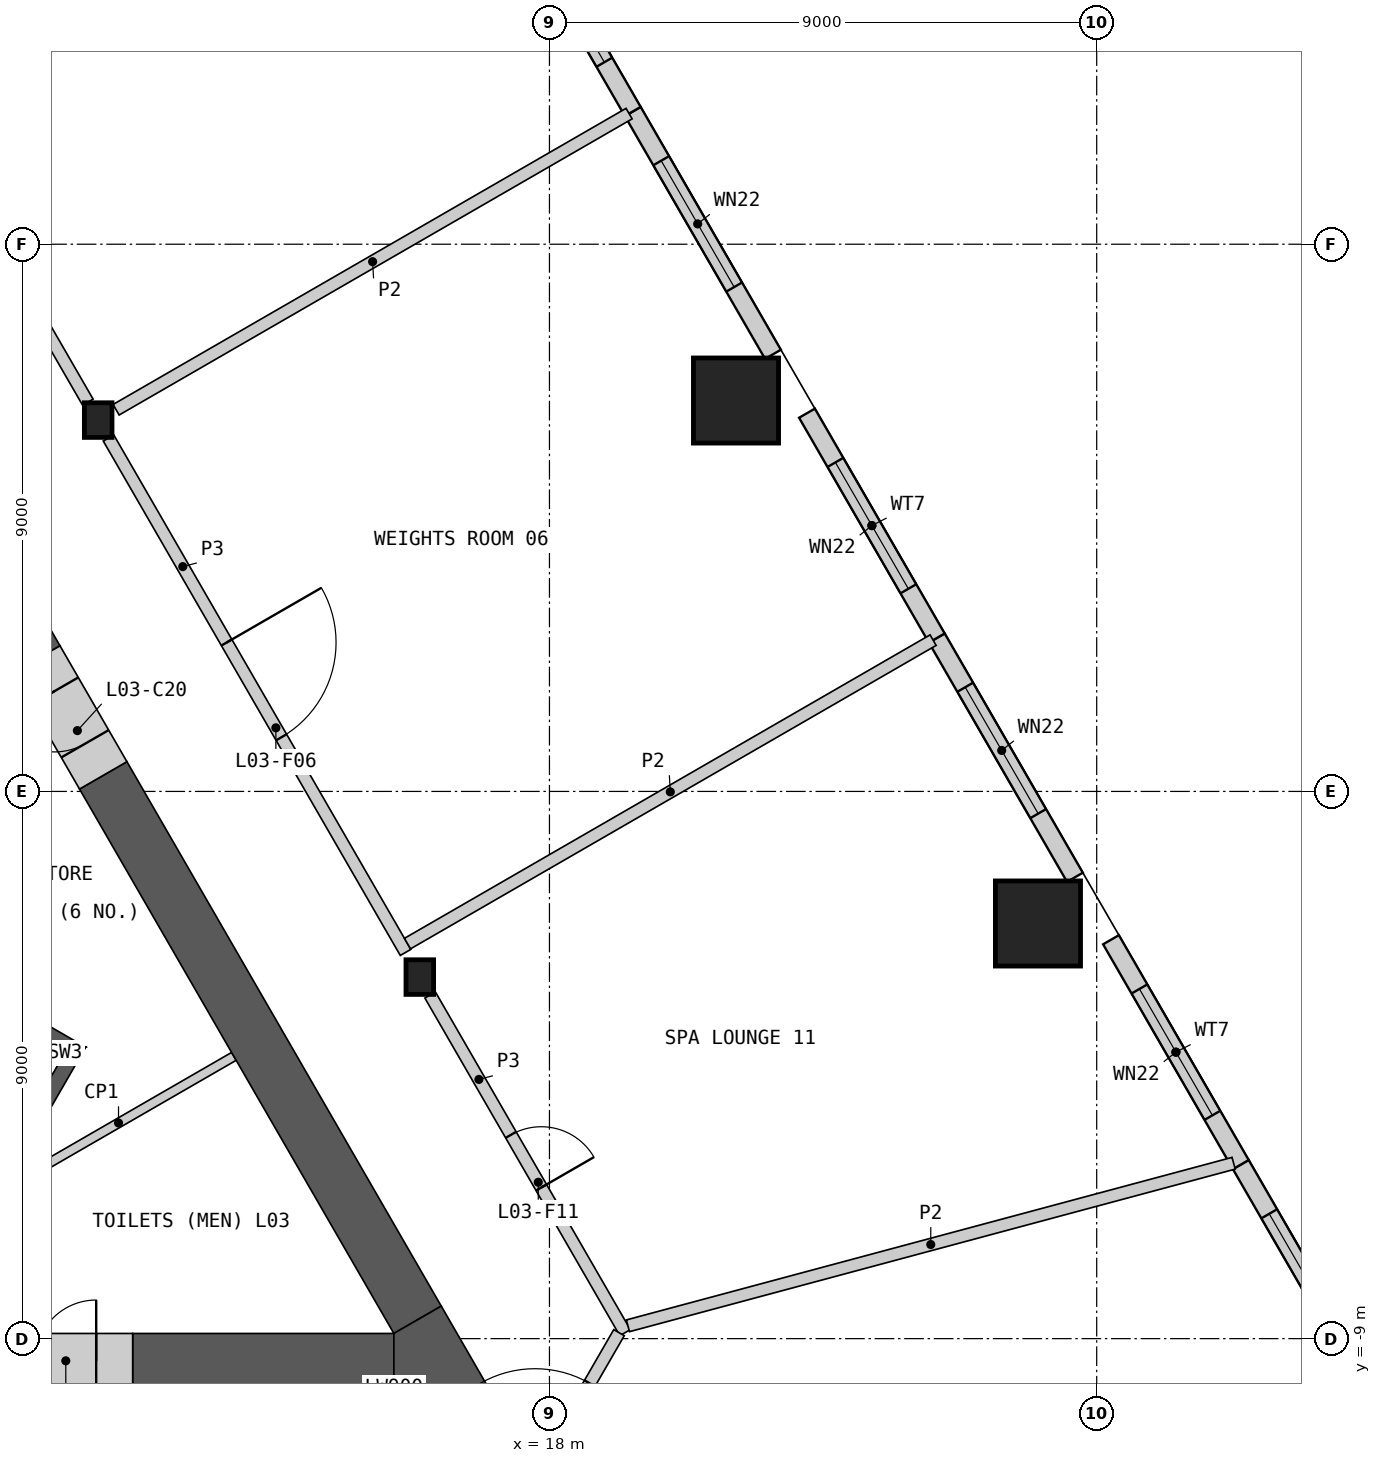
"""IFC4 building model, lengths in metres.
Left out: names, types, materials, properties, quantities, classifications, styles, units other than length and angle.
Written with IfcOpenShell. Run it as: python <this file> out.ifc"""

import sys

from ifc_helpers import new_model, si_unit, direction, frame, frame_2d, origin, origin_2d, place, context, subcontext, project, spatial, polyline, rectangle, hollow_rectangle, i_section, outline, extrude, element, fill, save


model = new_model("IFC4")
c1 = context("Model", 3, precision=1e-05, world=origin(), true_north=direction((0.0, 1.0)))
c2 = subcontext(c1, "Body", "Model", "MODEL_VIEW")
j1 = project(units=[si_unit("LENGTHUNIT", "METRE"), si_unit("PLANEANGLEUNIT", "RADIAN")], contexts=[c1])
p1 = place(None, origin())
s1 = spatial("IfcSite", under=j1, at=p1, CompositionType="ELEMENT")
p2 = place(p1, origin())
s2 = spatial("IfcBuilding", under=s1, at=p2, CompositionType="ELEMENT")
p3 = place(p2, frame((0.0, 0.0, 21.0)))
s3 = spatial("IfcBuildingStorey", under=s2, at=p3, CompositionType="ELEMENT", Elevation=21.0)
for number, where, z_axis, x_axis in (
    (1, (26.034, -2.172, 0.0), (0.0, 0.0, 1.0), (1.0, 0.0, 0.0)),
    (2, (21.068, 6.429, 0.0), (0.0, 0.0, 1.0), (1.0, 0.0, 0.0)),
):
    element("IfcColumn", number, at=place(p3, frame(where, z_axis=z_axis, x_axis=x_axis)), inside=s3, PredefinedType="COLUMN", context=c2, shape_type="SweptSolid", body=[
        extrude(hollow_rectangle(XDim=1.4, YDim=1.4, WallThickness=0.1, at=origin_2d()), origin(), (0.0, 0.0, 1.0), 4.5),
    ])
for number, where, z_axis, x_axis in (
    (3, (15.868, -3.054, 0.0), (0.0, 0.0, 1.0), (1.0, 0.0, 0.0)),
    (4, (10.578, 6.107, 0.0), (0.0, 0.0, 1.0), (1.0, 0.0, 0.0)),
):
    element("IfcColumn", number, at=place(p3, frame(where, z_axis=z_axis, x_axis=x_axis)), inside=s3, PredefinedType="COLUMN", context=c2, shape_type="SweptSolid", body=[
        extrude(i_section(OverallWidth=0.454, OverallDepth=0.57, WebThickness=0.078, FlangeThickness=0.125, at=origin_2d()), origin(), (0.0, 0.0, 1.0), 4.5),
    ])
p4 = place(p3, frame((31.608, -10.014, 0.0), z_axis=(0.0, 0.0, 1.0), x_axis=(-0.49999314502, 0.866029361473, 0.0)))
e5 = element("IfcWall", 5, at=p4, inside=s3, PredefinedType="SOLIDWALL", context=c2, shape_type="SweptSolid", body=[
    extrude(rectangle(XDim=4.476, YDim=0.3, at=frame_2d((2.238, 0.0))), origin(), (0.0, 0.0, 1.0), 4.05),
])
p5 = place(p4, frame((1.141, 0.0, 0.9)))
e6 = element("IfcOpeningElement", 6, at=p5, cuts=e5, PredefinedType="OPENING", context=c2, shape_type="SweptSolid", body=[
    extrude(rectangle(XDim=2.4, YDim=2.55, at=frame_2d((1.2, 1.275))), frame((0.0, 0.16, 0.0), z_axis=(0.0, -1.0, 0.0), x_axis=(1.0, 0.0, 0.0)), (0.0, 0.0, 1.0), 0.32),
])
p6 = place(p3, frame((29.37, -6.137, 0.0), z_axis=(0.0, 0.0, 1.0), x_axis=(-0.499994660107, 0.866028486751, 0.0)))
e7 = element("IfcWall", 7, at=p6, inside=s3, PredefinedType="SOLIDWALL", context=c2, shape_type="SweptSolid", body=[
    extrude(rectangle(XDim=4.27, YDim=0.3, at=frame_2d((2.135, 0.0))), origin(), (0.0, 0.0, 1.0), 4.05),
])
p7 = place(p6, frame((0.935, 0.0, 0.9)))
e8 = element("IfcOpeningElement", 8, at=p7, cuts=e7, PredefinedType="OPENING", context=c2, shape_type="SweptSolid", body=[
    extrude(rectangle(XDim=2.4, YDim=2.55, at=frame_2d((1.2, 1.275))), frame((0.0, 0.16, 0.0), z_axis=(0.0, -1.0, 0.0), x_axis=(1.0, 0.0, 0.0)), (0.0, 0.0, 1.0), 0.32),
])
p8 = place(p3, frame((26.642, -1.412, 0.0), z_axis=(0.0, 0.0, 1.0), x_axis=(-0.499964285679, 0.866046022475, 0.0)))
e9 = element("IfcWall", 9, at=p8, inside=s3, PredefinedType="SOLIDWALL", context=c2, shape_type="SweptSolid", body=[
    extrude(rectangle(XDim=4.544, YDim=0.3, at=frame_2d((2.272, 0.0))), origin(), (0.0, 0.0, 1.0), 4.05),
])
p9 = place(p8, frame((1.209, 0.0, 0.9)))
e10 = element("IfcOpeningElement", 10, at=p9, cuts=e9, PredefinedType="OPENING", context=c2, shape_type="SweptSolid", body=[
    extrude(rectangle(XDim=2.4, YDim=2.55, at=frame_2d((1.2, 1.275))), frame((0.0, 0.16, 0.0), z_axis=(0.0, -1.0, 0.0), x_axis=(1.0, 0.0, 0.0)), (0.0, 0.0, 1.0), 0.32),
])
p10 = place(p3, frame((24.37, 2.523, 0.0), z_axis=(0.0, 0.0, 1.0), x_axis=(-0.500019418418, 0.866014192265, 0.0)))
e11 = element("IfcWall", 11, at=p10, inside=s3, PredefinedType="SOLIDWALL", context=c2, shape_type="SweptSolid", body=[
    extrude(rectangle(XDim=4.27, YDim=0.3, at=frame_2d((2.135, 0.0))), origin(), (0.0, 0.0, 1.0), 4.05),
])
p11 = place(p10, frame((0.935, 0.0, 0.9)))
e12 = element("IfcOpeningElement", 12, at=p11, cuts=e11, PredefinedType="OPENING", context=c2, shape_type="SweptSolid", body=[
    extrude(rectangle(XDim=2.4, YDim=2.55, at=frame_2d((1.2, 1.275))), frame((0.0, 0.16, 0.0), z_axis=(0.0, -1.0, 0.0), x_axis=(1.0, 0.0, 0.0)), (0.0, 0.0, 1.0), 0.32),
])
p12 = place(p3, frame((21.676, 7.189, 0.0), z_axis=(0.0, 0.0, 1.0), x_axis=(-0.499982117899, 0.866035727774, 0.0)))
e13 = element("IfcWall", 13, at=p12, inside=s3, PredefinedType="SOLIDWALL", context=c2, shape_type="SweptSolid", body=[
    extrude(rectangle(XDim=4.612, YDim=0.3, at=frame_2d((2.306, 0.0))), origin(), (0.0, 0.0, 1.0), 4.05),
])
p13 = place(p12, frame((1.277, 0.0, 0.9)))
e14 = element("IfcOpeningElement", 14, at=p13, cuts=e13, PredefinedType="OPENING", context=c2, shape_type="SweptSolid", body=[
    extrude(rectangle(XDim=2.4, YDim=2.55, at=frame_2d((1.2, 1.275))), frame((0.0, 0.16, 0.0), z_axis=(0.0, -1.0, 0.0), x_axis=(1.0, 0.0, 0.0)), (0.0, 0.0, 1.0), 0.32),
])
p14 = place(p3, frame((19.37, 11.183, 0.0), z_axis=(0.0, 0.0, 1.0), x_axis=(-0.499994660107, 0.866028486751, 0.0)))
e15 = element("IfcWall", 15, at=p14, inside=s3, PredefinedType="SOLIDWALL", context=c2, shape_type="SweptSolid", body=[
    extrude(rectangle(XDim=4.27, YDim=0.3, at=frame_2d((2.135, 0.0))), origin(), (0.0, 0.0, 1.0), 4.05),
])
p15 = place(p14, frame((0.935, 0.0, 0.9)))
e16 = element("IfcOpeningElement", 16, at=p15, cuts=e15, PredefinedType="OPENING", context=c2, shape_type="SweptSolid", body=[
    extrude(rectangle(XDim=2.4, YDim=2.55, at=frame_2d((1.2, 1.275))), frame((0.0, 0.16, 0.0), z_axis=(0.0, -1.0, 0.0), x_axis=(1.0, 0.0, 0.0)), (0.0, 0.0, 1.0), 0.32),
])
p16 = place(p3, origin())
e17 = element("IfcWall", 17, at=p16, inside=s3, PredefinedType="SHEAR", context=c2, shape_type="SweptSolid", body=[
    extrude(outline(polyline([(8.83, -6.881), (10.374, -4.206), (10.032, -4.298), (8.738, -6.539), (8.83, -6.881)])), origin(), (0.0, 0.0, 1.0), 4.05),
])
p17 = place(p3, origin())
e18 = element("IfcWall", 18, at=p17, inside=s3, PredefinedType="SHEAR", context=c2, shape_type="SweptSolid", body=[
    extrude(outline(polyline([(10.032, -4.298), (10.374, -4.206), (5.307, -1.281), (5.182, -1.498), (10.032, -4.298)])), origin(), (0.0, 0.0, 1.0), 4.05),
])
p18 = place(p3, frame((12.81, -4.358, 0.0), z_axis=(0.0, 0.0, 1.0), x_axis=(-0.866043624834, -0.499968438888, 0.0)))
e19 = element("IfcWall", 19, at=p18, inside=s3, PredefinedType="PARTITIONING", context=c2, shape_type="SweptSolid", body=[
    extrude(rectangle(XDim=4.382, YDim=0.15, at=frame_2d((2.191, 0.0))), origin(), (0.0, 0.0, 1.0), 4.05),
])
p19 = place(p3, frame((11.146, -9.365, 0.0), z_axis=(0.0, 0.0, 1.0), x_axis=(1.0, 0.0, 0.0)))
e20 = element("IfcWall", 20, at=p19, inside=s3, PredefinedType="SHEAR", context=c2, shape_type="SweptSolid", body=[
    extrude(rectangle(XDim=4.296, YDim=0.9, at=frame_2d((2.148, 0.0))), origin(), (0.0, 0.0, 1.0), 4.05),
])
p20 = place(p3, frame((15.831, -8.69, 0.0), z_axis=(0.0, 0.0, 1.0), x_axis=(-0.500001798008, 0.866024365702, 0.0)))
e21 = element("IfcWall", 21, at=p20, inside=s3, PredefinedType="SHEAR", context=c2, shape_type="SweptSolid", body=[
    extrude(rectangle(XDim=10.339, YDim=0.9, at=frame_2d((5.17, 0.0))), origin(), (0.0, 0.0, 1.0), 4.05),
])
p21 = place(p3, frame((9.561, 2.169, 0.0), z_axis=(0.0, 0.0, 1.0), x_axis=(-0.499995114243, 0.866028224559, 0.0)))
e22 = element("IfcWall", 22, at=p21, inside=s3, PredefinedType="SHEAR", context=c2, shape_type="SweptSolid", body=[
    extrude(rectangle(XDim=7.906, YDim=0.9, at=frame_2d((3.953, 0.0))), origin(), (0.0, 0.0, 1.0), 4.05),
])
p22 = place(p3, origin())
e23 = element("IfcWall", 23, at=p22, inside=s3, PredefinedType="SHEAR", context=c2, shape_type="SweptSolid", body=[
    extrude(outline(polyline([(15.441, -9.815), (15.441, -8.915), (16.221, -8.465), (17.0, -9.815), (15.441, -9.815)])), origin(), (0.0, 0.0, 1.0), 4.05),
])
p23 = place(p3, frame((8.946, -9.365, 0.0), z_axis=(0.0, 0.0, 1.0), x_axis=(1.0, 0.0, 0.0)))
e24 = element("IfcWall", 24, at=p23, inside=s3, PredefinedType="SHEAR", context=c2, shape_type="SweptSolid", body=[
    extrude(rectangle(XDim=2.2, YDim=0.9, at=frame_2d((1.1, 0.0))), origin(), (0.0, 0.0, 1.0), 4.05),
])
p24 = place(p23, frame((0.6, 0.0, 0.0)))
e25 = element("IfcOpeningElement", 25, at=p24, cuts=e24, PredefinedType="OPENING", context=c2, shape_type="SweptSolid", body=[
    extrude(rectangle(XDim=1.0, YDim=2.1, at=frame_2d((0.5, 1.05))), frame((0.0, 0.46, 0.0), z_axis=(0.0, -1.0, 0.0), x_axis=(1.0, 0.0, 0.0)), (0.0, 0.0, 1.0), 0.92),
])
p25 = place(p3, frame((10.661, 0.264, 0.0), z_axis=(0.0, 0.0, 1.0), x_axis=(-0.500077893725, 0.86598042715, 0.0)))
e26 = element("IfcWall", 26, at=p25, inside=s3, PredefinedType="SHEAR", context=c2, shape_type="SweptSolid", body=[
    extrude(rectangle(XDim=2.2, YDim=0.9, at=frame_2d((1.1, 0.0))), origin(), (0.0, 0.0, 1.0), 4.05),
])
p26 = place(p25, frame((0.6, 0.0, 0.0)))
e27 = element("IfcOpeningElement", 27, at=p26, cuts=e26, PredefinedType="OPENING", context=c2, shape_type="SweptSolid", body=[
    extrude(rectangle(XDim=1.0, YDim=2.1, at=frame_2d((0.5, 1.05))), frame((0.0, 0.46, 0.0), z_axis=(0.0, -1.0, 0.0), x_axis=(1.0, 0.0, 0.0)), (0.0, 0.0, 1.0), 0.92),
])
p27 = place(p3, frame((5.459, 14.974, 0.0), z_axis=(0.0, 0.0, 1.0), x_axis=(0.499985793049, -0.866033606016, 0.0)))
e28 = element("IfcWall", 28, at=p27, inside=s3, PredefinedType="PARTITIONING", context=c2, shape_type="SweptSolid", body=[
    extrude(rectangle(XDim=9.898, YDim=0.2, at=frame_2d((4.949, 0.0))), origin(), (0.0, 0.0, 1.0), 4.05),
])
p28 = place(p27, frame((3.998, 0.0, 0.0)))
e29 = element("IfcOpeningElement", 29, at=p28, cuts=e28, PredefinedType="OPENING", context=c2, shape_type="SweptSolid", body=[
    extrude(rectangle(XDim=1.8, YDim=2.1, at=frame_2d((0.9, 1.05))), frame((0.0, 0.11, 0.0), z_axis=(0.0, -1.0, 0.0), x_axis=(1.0, 0.0, 0.0)), (0.0, 0.0, 1.0), 0.22),
])
p29 = place(p3, frame((10.749, 5.813, 0.0), z_axis=(0.0, 0.0, 1.0), x_axis=(0.500017363087, -0.866015378969, 0.0)))
e30 = element("IfcWall", 30, at=p29, inside=s3, PredefinedType="PARTITIONING", context=c2, shape_type="SweptSolid", body=[
    extrude(rectangle(XDim=9.77, YDim=0.2, at=frame_2d((4.885, 0.0))), origin(), (0.0, 0.0, 1.0), 4.05),
])
p30 = place(p29, frame((3.884, 0.0, 0.0)))
e31 = element("IfcOpeningElement", 31, at=p30, cuts=e30, PredefinedType="OPENING", context=c2, shape_type="SweptSolid", body=[
    extrude(rectangle(XDim=1.8, YDim=2.1, at=frame_2d((0.9, 1.05))), frame((0.0, 0.11, 0.0), z_axis=(0.0, -1.0, 0.0), x_axis=(1.0, 0.0, 0.0)), (0.0, 0.0, 1.0), 0.22),
])
p31 = place(p3, frame((16.038, -3.348, 0.0), z_axis=(0.0, 0.0, 1.0), x_axis=(0.499988314375, -0.866032150378, 0.0)))
e32 = element("IfcWall", 32, at=p31, inside=s3, PredefinedType="PARTITIONING", context=c2, shape_type="SweptSolid", body=[
    extrude(rectangle(XDim=6.412, YDim=0.2, at=frame_2d((3.206, 0.0))), origin(), (0.0, 0.0, 1.0), 4.05),
])
p32 = place(p31, frame((2.656, 0.0, 0.0)))
e33 = element("IfcOpeningElement", 33, at=p32, cuts=e32, PredefinedType="OPENING", context=c2, shape_type="SweptSolid", body=[
    extrude(rectangle(XDim=1.0, YDim=2.1, at=frame_2d((0.5, 1.05))), frame((0.0, 0.11, 0.0), z_axis=(0.0, -1.0, 0.0), x_axis=(1.0, 0.0, 0.0)), (0.0, 0.0, 1.0), 0.22),
])
p33 = place(p3, frame((17.281, -12.128, 0.0), z_axis=(0.0, 0.0, 1.0), x_axis=(0.499958791762, 0.866049194065, 0.0)))
e34 = element("IfcWall", 34, at=p33, inside=s3, PredefinedType="PARTITIONING", context=c2, shape_type="SweptSolid", body=[
    extrude(rectangle(XDim=3.726, YDim=0.2, at=frame_2d((1.863, 0.0))), origin(), (0.0, 0.0, 1.0), 4.05),
])
p34 = place(p33, frame((0.963, 0.0, 0.0)))
e35 = element("IfcOpeningElement", 35, at=p34, cuts=e34, PredefinedType="OPENING", context=c2, shape_type="SweptSolid", body=[
    extrude(rectangle(XDim=1.8, YDim=2.1, at=frame_2d((0.9, 1.05))), frame((0.0, 0.11, 0.0), z_axis=(0.0, -1.0, 0.0), x_axis=(1.0, 0.0, 0.0)), (0.0, 0.0, 1.0), 0.22),
])
p35 = place(p3, frame((19.291, -8.789, 0.0), z_axis=(0.0, 0.0, 1.0), x_axis=(0.965818413341, 0.259219583464, 0.0)))
e36 = element("IfcWall", 36, at=p35, inside=s3, PredefinedType="PARTITIONING", context=c2, shape_type="SweptSolid", body=[
    extrude(rectangle(XDim=10.314, YDim=0.2, at=frame_2d((5.157, 0.0))), origin(), (0.0, 0.0, 1.0), 4.05),
])
p36 = place(p3, frame((15.665, -2.503, 0.0), z_axis=(0.0, 0.0, 1.0), x_axis=(0.866034070548, 0.499984988425, 0.0)))
e37 = element("IfcWall", 37, at=p36, inside=s3, PredefinedType="PARTITIONING", context=c2, shape_type="SweptSolid", body=[
    extrude(rectangle(XDim=9.982, YDim=0.2, at=frame_2d((4.991, 0.0))), origin(), (0.0, 0.0, 1.0), 4.05),
])
p37 = place(p3, frame((10.873, 6.278, 0.0), z_axis=(0.0, 0.0, 1.0), x_axis=(0.866029077831, 0.499993636311, 0.0)))
e38 = element("IfcWall", 38, at=p37, inside=s3, PredefinedType="PARTITIONING", context=c2, shape_type="SweptSolid", body=[
    extrude(rectangle(XDim=9.741, YDim=0.2, at=frame_2d((4.871, 0.0))), origin(), (0.0, 0.0, 1.0), 4.05),
])
p38 = place(p5, origin())
e39 = element("IfcWindow", 39, at=p38, inside=s3, PartitioningType="SINGLE_PANEL", PredefinedType="WINDOW", context=c2, shape_type="SweptSolid", body=[
    extrude(rectangle(XDim=2.4, YDim=2.55, at=frame_2d((1.2, 1.275))), frame((0.0, 0.03, 0.0), z_axis=(0.0, -1.0, 0.0), x_axis=(1.0, 0.0, 0.0)), (0.0, 0.0, 1.0), 0.06),
])
fill(e6, e39)
p39 = place(p7, origin())
e40 = element("IfcWindow", 40, at=p39, inside=s3, PartitioningType="SINGLE_PANEL", PredefinedType="WINDOW", context=c2, shape_type="SweptSolid", body=[
    extrude(rectangle(XDim=2.4, YDim=2.55, at=frame_2d((1.2, 1.275))), frame((0.0, 0.03, 0.0), z_axis=(0.0, -1.0, 0.0), x_axis=(1.0, 0.0, 0.0)), (0.0, 0.0, 1.0), 0.06),
])
fill(e8, e40)
p40 = place(p9, origin())
e41 = element("IfcWindow", 41, at=p40, inside=s3, PartitioningType="SINGLE_PANEL", PredefinedType="WINDOW", context=c2, shape_type="SweptSolid", body=[
    extrude(rectangle(XDim=2.4, YDim=2.55, at=frame_2d((1.2, 1.275))), frame((0.0, 0.03, 0.0), z_axis=(0.0, -1.0, 0.0), x_axis=(1.0, 0.0, 0.0)), (0.0, 0.0, 1.0), 0.06),
])
fill(e10, e41)
p41 = place(p11, origin())
e42 = element("IfcWindow", 42, at=p41, inside=s3, PartitioningType="SINGLE_PANEL", PredefinedType="WINDOW", context=c2, shape_type="SweptSolid", body=[
    extrude(rectangle(XDim=2.4, YDim=2.55, at=frame_2d((1.2, 1.275))), frame((0.0, 0.03, 0.0), z_axis=(0.0, -1.0, 0.0), x_axis=(1.0, 0.0, 0.0)), (0.0, 0.0, 1.0), 0.06),
])
fill(e12, e42)
p42 = place(p13, origin())
e43 = element("IfcWindow", 43, at=p42, inside=s3, PartitioningType="SINGLE_PANEL", PredefinedType="WINDOW", context=c2, shape_type="SweptSolid", body=[
    extrude(rectangle(XDim=2.4, YDim=2.55, at=frame_2d((1.2, 1.275))), frame((0.0, 0.03, 0.0), z_axis=(0.0, -1.0, 0.0), x_axis=(1.0, 0.0, 0.0)), (0.0, 0.0, 1.0), 0.06),
])
fill(e14, e43)
p43 = place(p15, origin())
e44 = element("IfcWindow", 44, at=p43, inside=s3, PartitioningType="SINGLE_PANEL", PredefinedType="WINDOW", context=c2, shape_type="SweptSolid", body=[
    extrude(rectangle(XDim=2.4, YDim=2.55, at=frame_2d((1.2, 1.275))), frame((0.0, 0.03, 0.0), z_axis=(0.0, -1.0, 0.0), x_axis=(1.0, 0.0, 0.0)), (0.0, 0.0, 1.0), 0.06),
])
fill(e16, e44)
p44 = place(p24, origin())
e45 = element("IfcDoor", 45, at=p44, inside=s3, OperationType="SINGLE_SWING_RIGHT", PredefinedType="DOOR", context=c2, shape_type="SweptSolid", body=[
    extrude(rectangle(XDim=1.0, YDim=2.1, at=frame_2d((0.5, 1.05))), frame((0.0, 0.205, 0.0), z_axis=(0.0, -1.0, 0.0), x_axis=(1.0, 0.0, 0.0)), (0.0, 0.0, 1.0), 0.05),
])
fill(e25, e45)
p45 = place(p26, origin())
e46 = element("IfcDoor", 46, at=p45, inside=s3, OperationType="SINGLE_SWING_RIGHT", PredefinedType="DOOR", context=c2, shape_type="SweptSolid", body=[
    extrude(rectangle(XDim=1.0, YDim=2.1, at=frame_2d((0.5, 1.05))), frame((0.0, 0.205, 0.0), z_axis=(0.0, -1.0, 0.0), x_axis=(1.0, 0.0, 0.0)), (0.0, 0.0, 1.0), 0.05),
])
fill(e27, e46)
p46 = place(p30, origin())
e47 = element("IfcDoor", 47, at=p46, inside=s3, OperationType="DOUBLE_DOOR_SINGLE_SWING", PredefinedType="DOOR", context=c2, shape_type="SweptSolid", body=[
    extrude(rectangle(XDim=1.8, YDim=2.1, at=frame_2d((0.9, 1.05))), frame((0.0, 0.025, 0.0), z_axis=(0.0, -1.0, 0.0), x_axis=(1.0, 0.0, 0.0)), (0.0, 0.0, 1.0), 0.05),
])
fill(e31, e47)
p47 = place(p34, origin())
e48 = element("IfcDoor", 48, at=p47, inside=s3, OperationType="DOUBLE_DOOR_SINGLE_SWING", PredefinedType="DOOR", context=c2, shape_type="SweptSolid", body=[
    extrude(rectangle(XDim=1.8, YDim=2.1, at=frame_2d((0.9, 1.05))), frame((0.0, 0.025, 0.0), z_axis=(0.0, -1.0, 0.0), x_axis=(1.0, 0.0, 0.0)), (0.0, 0.0, 1.0), 0.05),
])
fill(e35, e48)
p48 = place(p32, origin())
e49 = element("IfcDoor", 49, at=p48, inside=s3, OperationType="SINGLE_SWING_RIGHT", PredefinedType="DOOR", context=c2, shape_type="SweptSolid", body=[
    extrude(rectangle(XDim=1.0, YDim=2.1, at=frame_2d((0.5, 1.05))), frame((0.0, 0.025, 0.0), z_axis=(0.0, -1.0, 0.0), x_axis=(1.0, 0.0, 0.0)), (0.0, 0.0, 1.0), 0.05),
])
fill(e33, e49)
save(model, sys.argv[1])
